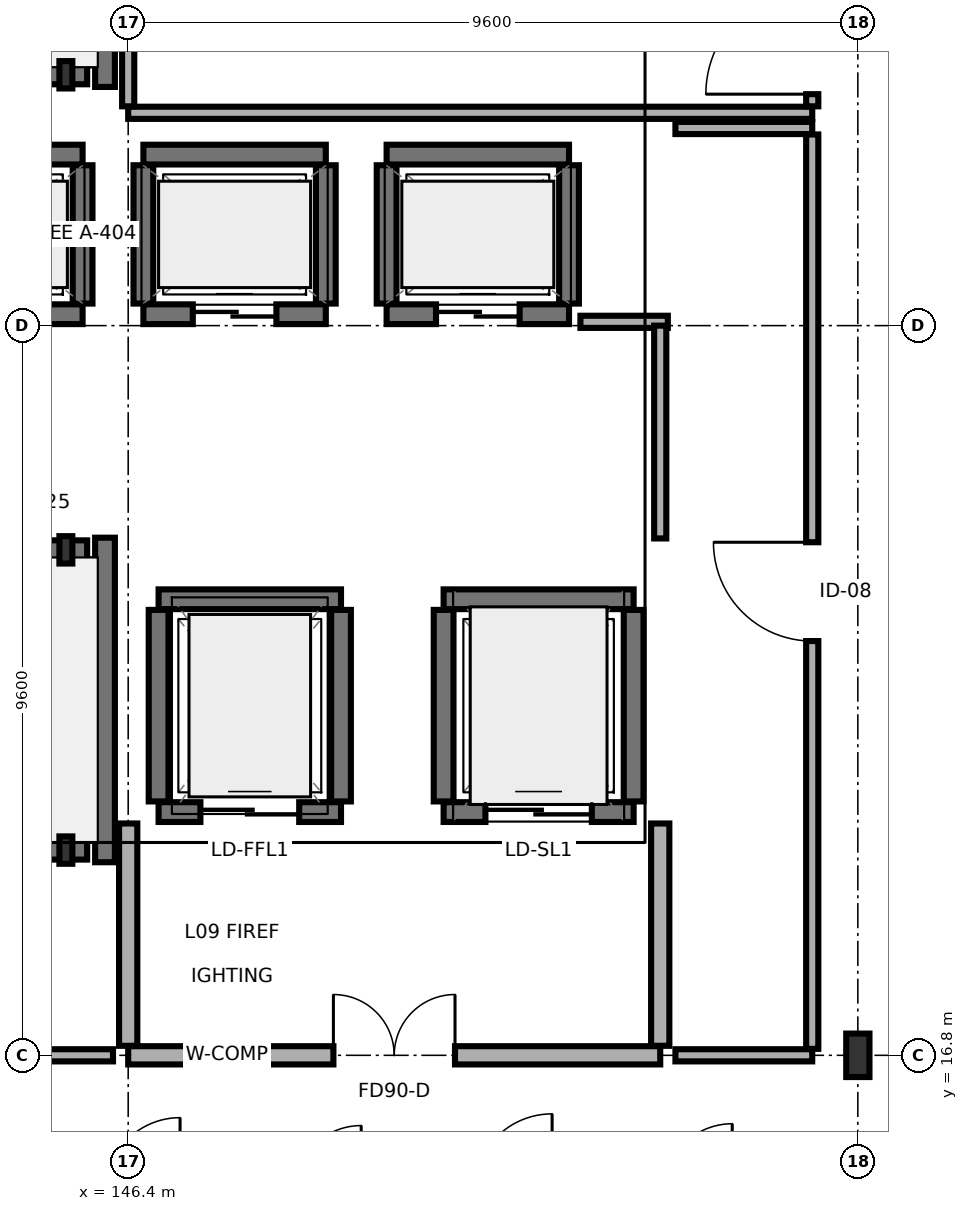
"""IFC4 building model, lengths in metres.
Left out: names, types, materials, properties, quantities, classifications, styles, units other than length and angle.
Written with IfcOpenShell. Run it as: python <this file> out.ifc"""

import sys

from ifc_helpers import new_model, si_unit, direction, frame, frame_2d, origin, origin_2d, place, context, subcontext, project, spatial, rectangle, i_section, extrude, element, fill, save


model = new_model("IFC4")
c1 = context("Model", 3, precision=1e-05, world=origin(), true_north=direction((0.0, 1.0)))
c2 = subcontext(c1, "Body", "Model", "MODEL_VIEW")
j1 = project(units=[si_unit("LENGTHUNIT", "METRE"), si_unit("PLANEANGLEUNIT", "RADIAN")], contexts=[c1])
p1 = place(None, origin())
s1 = spatial("IfcSite", under=j1, at=p1, CompositionType="ELEMENT")
p2 = place(p1, origin())
s2 = spatial("IfcBuilding", under=s1, at=p2, CompositionType="ELEMENT")
p3 = place(p2, frame((0.0, 0.0, 31.7)))
s3 = spatial("IfcBuildingStorey", under=s2, at=p3, CompositionType="ELEMENT", Elevation=31.7)
p4 = place(p3, frame((156.0, 16.8, 0.0), z_axis=(0.0, 0.0, 1.0), x_axis=(1.0, 0.0, 0.0)))
e1 = element("IfcColumn", 1, at=p4, inside=s3, PredefinedType="COLUMN", context=c2, shape_type="SweptSolid", body=[
    extrude(i_section(OverallWidth=0.306, OverallDepth=0.572, WebThickness=0.021, FlangeThickness=0.04, FilletRadius=0.027, at=origin_2d()), origin(), (0.0, 0.0, 1.0), 3.4),
])
for number, where, z_axis, x_axis in (
    (2, (145.58, 19.5, 0.0), (0.0, 0.0, 1.0), (1.0, 0.0, 0.0)),
    (3, (145.58, 23.45, 0.0), (0.0, 0.0, 1.0), (1.0, 0.0, 0.0)),
    (4, (145.58, 29.7, 0.0), (0.0, 0.0, 1.0), (1.0, 0.0, 0.0)),
):
    element("IfcColumn", number, at=place(p3, frame(where, z_axis=z_axis, x_axis=x_axis)), inside=s3, PredefinedType="PILASTER", context=c2, shape_type="SweptSolid", body=[
        extrude(i_section(OverallWidth=0.17, OverallDepth=0.36, WebThickness=0.008, FlangeThickness=0.013, FilletRadius=0.018, at=origin_2d()), origin(), (0.0, 0.0, 1.0), 3.4),
    ])
p5 = place(p3, frame((146.095, 19.34, 0.0), z_axis=(0.0, 0.0, 1.0), x_axis=(0.0, 1.0, 0.0)))
e5 = element("IfcWall", 5, at=p5, inside=s3, PredefinedType="SHEAR", context=c2, shape_type="SweptSolid", body=[
    extrude(rectangle(XDim=4.27, YDim=0.26, at=frame_2d((2.135, 0.0))), origin(), (0.0, 0.0, 1.0), 3.17),
])
for number, where, z_axis, x_axis in (
    (6, (137.34, 19.505, 0.0), (0.0, 0.0, 1.0), (1.0, 0.0, 0.0)),
    (7, (137.34, 23.445, 0.0), (0.0, 0.0, 1.0), (1.0, 0.0, 0.0)),
):
    element("IfcWall", number, at=place(p3, frame(where, z_axis=z_axis, x_axis=x_axis)), inside=s3, PredefinedType="SHEAR", context=c2, shape_type="SweptSolid", body=[
        extrude(rectangle(XDim=8.52, YDim=0.26, at=frame_2d((4.26, 0.0))), origin(), (0.0, 0.0, 1.0), 3.17),
    ])
p6 = place(p3, frame((146.095, 29.54, 0.0), z_axis=(0.0, 0.0, 1.0), x_axis=(0.0, 1.0, 0.0)))
e8 = element("IfcWall", 8, at=p6, inside=s3, PredefinedType="SHEAR", context=c2, shape_type="SweptSolid", body=[
    extrude(rectangle(XDim=4.635, YDim=0.26, at=frame_2d((2.317, 0.0))), origin(), (0.0, 0.0, 1.0), 3.17),
])
p7 = place(p3, frame((137.34, 29.705, 0.0), z_axis=(0.0, 0.0, 1.0), x_axis=(1.0, 0.0, 0.0)))
e9 = element("IfcWall", 9, at=p7, inside=s3, PredefinedType="SHEAR", context=c2, shape_type="SweptSolid", body=[
    extrude(rectangle(XDim=8.52, YDim=0.26, at=frame_2d((4.26, 0.0))), origin(), (0.0, 0.0, 1.0), 3.17),
])
p8 = place(p3, frame((143.4, 26.55, 0.0), z_axis=(0.0, 0.0, 1.0), x_axis=(1.0, 0.0, 0.0)))
e10 = element("IfcWall", 10, at=p8, inside=s3, PredefinedType="SHEAR", context=c2, shape_type="SweptSolid", body=[
    extrude(rectangle(XDim=2.4, YDim=0.26, at=frame_2d((1.2, 0.0))), origin(), (0.0, 0.0, 1.0), 3.17),
])
p9 = place(p8, frame((0.65, 0.0, 0.0)))
e11 = element("IfcOpeningElement", 11, at=p9, cuts=e10, PredefinedType="OPENING", context=c2, shape_type="SweptSolid", body=[
    extrude(rectangle(XDim=1.1, YDim=2.2, at=frame_2d((0.55, 1.1))), frame((0.0, 0.14, 0.0), z_axis=(0.0, -1.0, 0.0), x_axis=(1.0, 0.0, 0.0)), (0.0, 0.0, 1.0), 0.28),
])
p10 = place(p3, frame((143.4, 28.65, 0.0), z_axis=(0.0, 0.0, 1.0), x_axis=(1.0, 0.0, 0.0)))
e12 = element("IfcWall", 12, at=p10, inside=s3, PredefinedType="SHEAR", context=c2, shape_type="SweptSolid", body=[
    extrude(rectangle(XDim=2.4, YDim=0.26, at=frame_2d((1.2, 0.0))), origin(), (0.0, 0.0, 1.0), 3.17),
])
p11 = place(p3, frame((145.8, 26.69, 0.0), z_axis=(0.0, 0.0, 1.0), x_axis=(0.0, 1.0, 0.0)))
e13 = element("IfcWall", 13, at=p11, inside=s3, PredefinedType="SHEAR", context=c2, shape_type="SweptSolid", body=[
    extrude(rectangle(XDim=1.82, YDim=0.26, at=frame_2d((0.91, 0.0))), origin(), (0.0, 0.0, 1.0), 3.17),
])
p12 = place(p3, frame((146.6, 26.55, 0.0), z_axis=(0.0, 0.0, 1.0), x_axis=(1.0, 0.0, 0.0)))
e14 = element("IfcWall", 14, at=p12, inside=s3, PredefinedType="SHEAR", context=c2, shape_type="SweptSolid", body=[
    extrude(rectangle(XDim=2.4, YDim=0.26, at=frame_2d((1.2, 0.0))), origin(), (0.0, 0.0, 1.0), 3.17),
])
p13 = place(p12, frame((0.65, 0.0, 0.0)))
e15 = element("IfcOpeningElement", 15, at=p13, cuts=e14, PredefinedType="OPENING", context=c2, shape_type="SweptSolid", body=[
    extrude(rectangle(XDim=1.1, YDim=2.2, at=frame_2d((0.55, 1.1))), frame((0.0, 0.14, 0.0), z_axis=(0.0, -1.0, 0.0), x_axis=(1.0, 0.0, 0.0)), (0.0, 0.0, 1.0), 0.28),
])
p14 = place(p3, frame((146.6, 28.65, 0.0), z_axis=(0.0, 0.0, 1.0), x_axis=(1.0, 0.0, 0.0)))
e16 = element("IfcWall", 16, at=p14, inside=s3, PredefinedType="SHEAR", context=c2, shape_type="SweptSolid", body=[
    extrude(rectangle(XDim=2.4, YDim=0.26, at=frame_2d((1.2, 0.0))), origin(), (0.0, 0.0, 1.0), 3.17),
])
for number, where, z_axis, x_axis in (
    (17, (146.6, 26.69, 0.0), (0.0, 0.0, 1.0), (0.0, 1.0, 0.0)),
    (18, (149.0, 26.69, 0.0), (0.0, 0.0, 1.0), (0.0, 1.0, 0.0)),
):
    element("IfcWall", number, at=place(p3, frame(where, z_axis=z_axis, x_axis=x_axis)), inside=s3, PredefinedType="SHEAR", context=c2, shape_type="SweptSolid", body=[
        extrude(rectangle(XDim=1.82, YDim=0.26, at=frame_2d((0.91, 0.0))), origin(), (0.0, 0.0, 1.0), 3.17),
    ])
p15 = place(p3, frame((149.8, 26.55, 0.0), z_axis=(0.0, 0.0, 1.0), x_axis=(1.0, 0.0, 0.0)))
e19 = element("IfcWall", 19, at=p15, inside=s3, PredefinedType="SHEAR", context=c2, shape_type="SweptSolid", body=[
    extrude(rectangle(XDim=2.4, YDim=0.26, at=frame_2d((1.2, 0.0))), origin(), (0.0, 0.0, 1.0), 3.17),
])
p16 = place(p15, frame((0.65, 0.0, 0.0)))
e20 = element("IfcOpeningElement", 20, at=p16, cuts=e19, PredefinedType="OPENING", context=c2, shape_type="SweptSolid", body=[
    extrude(rectangle(XDim=1.1, YDim=2.2, at=frame_2d((0.55, 1.1))), frame((0.0, 0.14, 0.0), z_axis=(0.0, -1.0, 0.0), x_axis=(1.0, 0.0, 0.0)), (0.0, 0.0, 1.0), 0.28),
])
p17 = place(p3, frame((149.8, 28.65, 0.0), z_axis=(0.0, 0.0, 1.0), x_axis=(1.0, 0.0, 0.0)))
e21 = element("IfcWall", 21, at=p17, inside=s3, PredefinedType="SHEAR", context=c2, shape_type="SweptSolid", body=[
    extrude(rectangle(XDim=2.4, YDim=0.26, at=frame_2d((1.2, 0.0))), origin(), (0.0, 0.0, 1.0), 3.17),
])
for number, where, z_axis, x_axis in (
    (22, (149.8, 26.69, 0.0), (0.0, 0.0, 1.0), (0.0, 1.0, 0.0)),
    (23, (152.2, 26.69, 0.0), (0.0, 0.0, 1.0), (0.0, 1.0, 0.0)),
):
    element("IfcWall", number, at=place(p3, frame(where, z_axis=z_axis, x_axis=x_axis)), inside=s3, PredefinedType="SHEAR", context=c2, shape_type="SweptSolid", body=[
        extrude(rectangle(XDim=1.82, YDim=0.26, at=frame_2d((0.91, 0.0))), origin(), (0.0, 0.0, 1.0), 3.17),
    ])
p18 = place(p3, frame((146.8, 20.0, 0.0), z_axis=(0.0, 0.0, 1.0), x_axis=(1.0, 0.0, 0.0)))
e24 = element("IfcWall", 24, at=p18, inside=s3, PredefinedType="SHEAR", context=c2, shape_type="SweptSolid", body=[
    extrude(rectangle(XDim=2.4, YDim=0.26, at=frame_2d((1.2, 0.0))), origin(), (0.0, 0.0, 1.0), 3.17),
])
p19 = place(p18, frame((0.55, 0.0, 0.0)))
e25 = element("IfcOpeningElement", 25, at=p19, cuts=e24, PredefinedType="OPENING", context=c2, shape_type="SweptSolid", body=[
    extrude(rectangle(XDim=1.3, YDim=2.25, at=frame_2d((0.65, 1.125))), frame((0.0, 0.14, 0.0), z_axis=(0.0, -1.0, 0.0), x_axis=(1.0, 0.0, 0.0)), (0.0, 0.0, 1.0), 0.28),
])
p20 = place(p3, frame((146.8, 22.8, 0.0), z_axis=(0.0, 0.0, 1.0), x_axis=(1.0, 0.0, 0.0)))
e26 = element("IfcWall", 26, at=p20, inside=s3, PredefinedType="SHEAR", context=c2, shape_type="SweptSolid", body=[
    extrude(rectangle(XDim=2.4, YDim=0.26, at=frame_2d((1.2, 0.0))), origin(), (0.0, 0.0, 1.0), 3.17),
])
for number, where, z_axis, x_axis in (
    (27, (146.8, 20.14, 0.0), (0.0, 0.0, 1.0), (0.0, 1.0, 0.0)),
    (28, (149.2, 20.14, 0.0), (0.0, 0.0, 1.0), (0.0, 1.0, 0.0)),
):
    element("IfcWall", number, at=place(p3, frame(where, z_axis=z_axis, x_axis=x_axis)), inside=s3, PredefinedType="SHEAR", context=c2, shape_type="SweptSolid", body=[
        extrude(rectangle(XDim=2.52, YDim=0.26, at=frame_2d((1.26, 0.0))), origin(), (0.0, 0.0, 1.0), 3.17),
    ])
p21 = place(p3, frame((150.55, 20.0, 0.0), z_axis=(0.0, 0.0, 1.0), x_axis=(1.0, 0.0, 0.0)))
e29 = element("IfcWall", 29, at=p21, inside=s3, PredefinedType="SHEAR", context=c2, shape_type="SweptSolid", body=[
    extrude(rectangle(XDim=2.5, YDim=0.26, at=frame_2d((1.25, 0.0))), origin(), (0.0, 0.0, 1.0), 3.17),
])
p22 = place(p21, frame((0.55, 0.0, 0.0)))
e30 = element("IfcOpeningElement", 30, at=p22, cuts=e29, PredefinedType="OPENING", context=c2, shape_type="SweptSolid", body=[
    extrude(rectangle(XDim=1.4, YDim=2.3, at=frame_2d((0.7, 1.15))), frame((0.0, 0.14, 0.0), z_axis=(0.0, -1.0, 0.0), x_axis=(1.0, 0.0, 0.0)), (0.0, 0.0, 1.0), 0.28),
])
p23 = place(p3, frame((150.55, 22.8, 0.0), z_axis=(0.0, 0.0, 1.0), x_axis=(1.0, 0.0, 0.0)))
e31 = element("IfcWall", 31, at=p23, inside=s3, PredefinedType="SHEAR", context=c2, shape_type="SweptSolid", body=[
    extrude(rectangle(XDim=2.5, YDim=0.26, at=frame_2d((1.25, 0.0))), origin(), (0.0, 0.0, 1.0), 3.17),
])
for number, where, z_axis, x_axis in (
    (32, (150.55, 20.14, 0.0), (0.0, 0.0, 1.0), (0.0, 1.0, 0.0)),
    (33, (153.05, 20.14, 0.0), (0.0, 0.0, 1.0), (0.0, 1.0, 0.0)),
):
    element("IfcWall", number, at=place(p3, frame(where, z_axis=z_axis, x_axis=x_axis)), inside=s3, PredefinedType="SHEAR", context=c2, shape_type="SweptSolid", body=[
        extrude(rectangle(XDim=2.52, YDim=0.26, at=frame_2d((1.26, 0.0))), origin(), (0.0, 0.0, 1.0), 3.17),
    ])
p24 = place(p3, frame((146.4, 16.8, 0.0), z_axis=(0.0, 0.0, 1.0), x_axis=(1.0, 0.0, 0.0)))
e34 = element("IfcWall", 34, at=p24, inside=s3, PredefinedType="SOLIDWALL", context=c2, shape_type="SweptSolid", body=[
    extrude(rectangle(XDim=7.0, YDim=0.24, at=frame_2d((3.5, 0.0))), origin(), (0.0, 0.0, 1.0), 2.705),
])
p25 = place(p24, frame((2.7, 0.0, 0.0)))
e35 = element("IfcOpeningElement", 35, at=p25, cuts=e34, PredefinedType="OPENING", context=c2, shape_type="SweptSolid", body=[
    extrude(rectangle(XDim=1.6, YDim=2.2, at=frame_2d((0.8, 1.1))), frame((0.0, 0.13, 0.0), z_axis=(0.0, -1.0, 0.0), x_axis=(1.0, 0.0, 0.0)), (0.0, 0.0, 1.0), 0.26),
])
for number, where, z_axis, x_axis in (
    (36, (146.4, 16.925, 0.0), (0.0, 0.0, 1.0), (0.0, 1.0, 0.0)),
    (37, (153.4, 16.925, 0.0), (0.0, 0.0, 1.0), (0.0, 1.0, 0.0)),
):
    element("IfcWall", number, at=place(p3, frame(where, z_axis=z_axis, x_axis=x_axis)), inside=s3, PredefinedType="SOLIDWALL", context=c2, shape_type="SweptSolid", body=[
        extrude(rectangle(XDim=2.925, YDim=0.24, at=frame_2d((1.462, 0.0))), origin(), (0.0, 0.0, 1.0), 2.705),
    ])
p26 = place(p3, frame((140.55, 16.8, 0.0), z_axis=(0.0, 0.0, 1.0), x_axis=(1.0, 0.0, 0.0)))
e38 = element("IfcWall", 38, at=p26, inside=s3, PredefinedType="PARTITIONING", context=c2, shape_type="SweptSolid", body=[
    extrude(rectangle(XDim=5.65, YDim=0.16, at=frame_2d((2.825, 0.0))), origin(), (0.0, 0.0, 1.0), 2.705),
])
p27 = place(p26, frame((2.175, 0.0, 0.0)))
e39 = element("IfcOpeningElement", 39, at=p27, cuts=e38, PredefinedType="OPENING", context=c2, shape_type="SweptSolid", body=[
    extrude(rectangle(XDim=1.3, YDim=2.2, at=frame_2d((0.65, 1.1))), frame((0.0, 0.09, 0.0), z_axis=(0.0, -1.0, 0.0), x_axis=(1.0, 0.0, 0.0)), (0.0, 0.0, 1.0), 0.18),
])
p28 = place(p3, frame((146.4, 29.2, 0.0), z_axis=(0.0, 0.0, 1.0), x_axis=(1.0, 0.0, 0.0)))
e40 = element("IfcWall", 40, at=p28, inside=s3, PredefinedType="PARTITIONING", context=c2, shape_type="SweptSolid", body=[
    extrude(rectangle(XDim=9.0, YDim=0.16, at=frame_2d((4.5, 0.0))), origin(), (0.0, 0.0, 1.0), 3.17),
])
p29 = place(p3, frame((146.4, 29.285, 0.0), z_axis=(0.0, 0.0, 1.0), x_axis=(0.0, 1.0, 0.0)))
e41 = element("IfcWall", 41, at=p29, inside=s3, PredefinedType="PARTITIONING", context=c2, shape_type="SweptSolid", body=[
    extrude(rectangle(XDim=4.915, YDim=0.16, at=frame_2d((2.458, 0.0))), origin(), (0.0, 0.0, 1.0), 3.17),
])
p30 = place(p3, frame((155.4, 29.285, 0.0), z_axis=(0.0, 0.0, 1.0), x_axis=(0.0, 1.0, 0.0)))
e42 = element("IfcWall", 42, at=p30, inside=s3, PredefinedType="PARTITIONING", context=c2, shape_type="SweptSolid", body=[
    extrude(rectangle(XDim=9.03, YDim=0.16, at=frame_2d((4.515, 0.0))), origin(), (0.0, 0.0, 1.0), 3.17),
])
p31 = place(p30, frame((0.16, 0.0, 0.0)))
e43 = element("IfcOpeningElement", 43, at=p31, cuts=e42, PredefinedType="OPENING", context=c2, shape_type="SweptSolid", body=[
    extrude(rectangle(XDim=1.4, YDim=2.2, at=frame_2d((0.7, 1.1))), frame((0.0, 0.09, 0.0), z_axis=(0.0, -1.0, 0.0), x_axis=(1.0, 0.0, 0.0)), (0.0, 0.0, 1.0), 0.18),
])
p32 = place(p3, frame((153.6, 16.8, 0.0), z_axis=(0.0, 0.0, 1.0), x_axis=(1.0, 0.0, 0.0)))
e44 = element("IfcWall", 44, at=p32, inside=s3, PredefinedType="PARTITIONING", context=c2, shape_type="SweptSolid", body=[
    extrude(rectangle(XDim=1.8, YDim=0.16, at=frame_2d((0.9, 0.0))), origin(), (0.0, 0.0, 1.0), 2.705),
])
p33 = place(p3, frame((153.6, 29.0, 0.0), z_axis=(0.0, 0.0, 1.0), x_axis=(1.0, 0.0, 0.0)))
e45 = element("IfcWall", 45, at=p33, inside=s3, PredefinedType="PARTITIONING", context=c2, shape_type="SweptSolid", body=[
    extrude(rectangle(XDim=1.8, YDim=0.16, at=frame_2d((0.9, 0.0))), origin(), (0.0, 0.0, 1.0), 3.17),
])
p34 = place(p3, frame((155.4, 16.885, 0.0), z_axis=(0.0, 0.0, 1.0), x_axis=(0.0, 1.0, 0.0)))
e46 = element("IfcWall", 46, at=p34, inside=s3, PredefinedType="PARTITIONING", context=c2, shape_type="SweptSolid", body=[
    extrude(rectangle(XDim=12.03, YDim=0.16, at=frame_2d((6.015, 0.0))), origin(), (0.0, 0.0, 1.0), 2.705),
])
p35 = place(p34, frame((5.365, 0.0, 0.0)))
e47 = element("IfcOpeningElement", 47, at=p35, cuts=e46, PredefinedType="OPENING", context=c2, shape_type="SweptSolid", body=[
    extrude(rectangle(XDim=1.3, YDim=2.2, at=frame_2d((0.65, 1.1))), frame((0.0, 0.09, 0.0), z_axis=(0.0, -1.0, 0.0), x_axis=(1.0, 0.0, 0.0)), (0.0, 0.0, 1.0), 0.18),
])
p36 = place(p3, frame((152.35, 26.45, 0.0), z_axis=(0.0, 0.0, 1.0), x_axis=(1.0, 0.0, 0.0)))
e48 = element("IfcWall", 48, at=p36, inside=s3, PredefinedType="PARTITIONING", context=c2, shape_type="SweptSolid", body=[
    extrude(rectangle(XDim=1.15, YDim=0.16, at=frame_2d((0.575, 0.0))), origin(), (0.0, 0.0, 1.0), 3.17),
])
p37 = place(p3, frame((153.4, 23.6, 0.0), z_axis=(0.0, 0.0, 1.0), x_axis=(0.0, 1.0, 0.0)))
e49 = element("IfcWall", 49, at=p37, inside=s3, PredefinedType="PARTITIONING", context=c2, shape_type="SweptSolid", body=[
    extrude(rectangle(XDim=2.8, YDim=0.16, at=frame_2d((1.4, 0.0))), origin(), (0.0, 0.0, 1.0), 3.17),
])
p38 = place(p13, origin())
e50 = element("IfcDoor", 50, at=p38, inside=s3, OperationType="SLIDING_TO_RIGHT", PredefinedType="DOOR", context=c2, shape_type="SweptSolid", body=[
    extrude(rectangle(XDim=1.1, YDim=2.2, at=frame_2d((0.55, 1.1))), frame((0.0, 0.025, 0.0), z_axis=(0.0, -1.0, 0.0), x_axis=(1.0, 0.0, 0.0)), (0.0, 0.0, 1.0), 0.05),
])
fill(e15, e50)
p39 = place(p16, origin())
e51 = element("IfcDoor", 51, at=p39, inside=s3, OperationType="SLIDING_TO_LEFT", PredefinedType="DOOR", context=c2, shape_type="SweptSolid", body=[
    extrude(rectangle(XDim=1.1, YDim=2.2, at=frame_2d((0.55, 1.1))), frame((0.0, 0.025, 0.0), z_axis=(0.0, -1.0, 0.0), x_axis=(1.0, 0.0, 0.0)), (0.0, 0.0, 1.0), 0.05),
])
fill(e20, e51)
p40 = place(p19, origin())
e52 = element("IfcDoor", 52, at=p40, inside=s3, OperationType="SLIDING_TO_RIGHT", PredefinedType="DOOR", context=c2, shape_type="SweptSolid", body=[
    extrude(rectangle(XDim=1.3, YDim=2.25, at=frame_2d((0.65, 1.125))), frame((0.0, 0.025, 0.0), z_axis=(0.0, -1.0, 0.0), x_axis=(1.0, 0.0, 0.0)), (0.0, 0.0, 1.0), 0.05),
])
fill(e25, e52)
p41 = place(p22, origin())
e53 = element("IfcDoor", 53, at=p41, inside=s3, OperationType="SLIDING_TO_LEFT", PredefinedType="DOOR", context=c2, shape_type="SweptSolid", body=[
    extrude(rectangle(XDim=1.4, YDim=2.3, at=frame_2d((0.7, 1.15))), frame((0.0, 0.025, 0.0), z_axis=(0.0, -1.0, 0.0), x_axis=(1.0, 0.0, 0.0)), (0.0, 0.0, 1.0), 0.05),
])
fill(e30, e53)
p42 = place(p25, origin())
e54 = element("IfcDoor", 54, at=p42, inside=s3, OperationType="DOUBLE_DOOR_SINGLE_SWING", PredefinedType="DOOR", context=c2, shape_type="SweptSolid", body=[
    extrude(rectangle(XDim=1.6, YDim=2.2, at=frame_2d((0.8, 1.1))), frame((0.0, 0.025, 0.0), z_axis=(0.0, -1.0, 0.0), x_axis=(1.0, 0.0, 0.0)), (0.0, 0.0, 1.0), 0.05),
])
fill(e35, e54)
p43 = place(p31, origin())
e55 = element("IfcDoor", 55, at=p43, inside=s3, OperationType="SINGLE_SWING_LEFT", PredefinedType="DOOR", context=c2, shape_type="SweptSolid", body=[
    extrude(rectangle(XDim=1.4, YDim=2.2, at=frame_2d((0.7, 1.1))), frame((0.0, 0.025, 0.0), z_axis=(0.0, -1.0, 0.0), x_axis=(1.0, 0.0, 0.0)), (0.0, 0.0, 1.0), 0.05),
])
fill(e43, e55)
p44 = place(p35, origin())
e56 = element("IfcDoor", 56, at=p44, inside=s3, OperationType="SINGLE_SWING_RIGHT", PredefinedType="DOOR", context=c2, shape_type="SweptSolid", body=[
    extrude(rectangle(XDim=1.3, YDim=2.2, at=frame_2d((0.65, 1.1))), frame((0.0, 0.025, 0.0), z_axis=(0.0, -1.0, 0.0), x_axis=(1.0, 0.0, 0.0)), (0.0, 0.0, 1.0), 0.05),
])
fill(e47, e56)
save(model, sys.argv[1])
